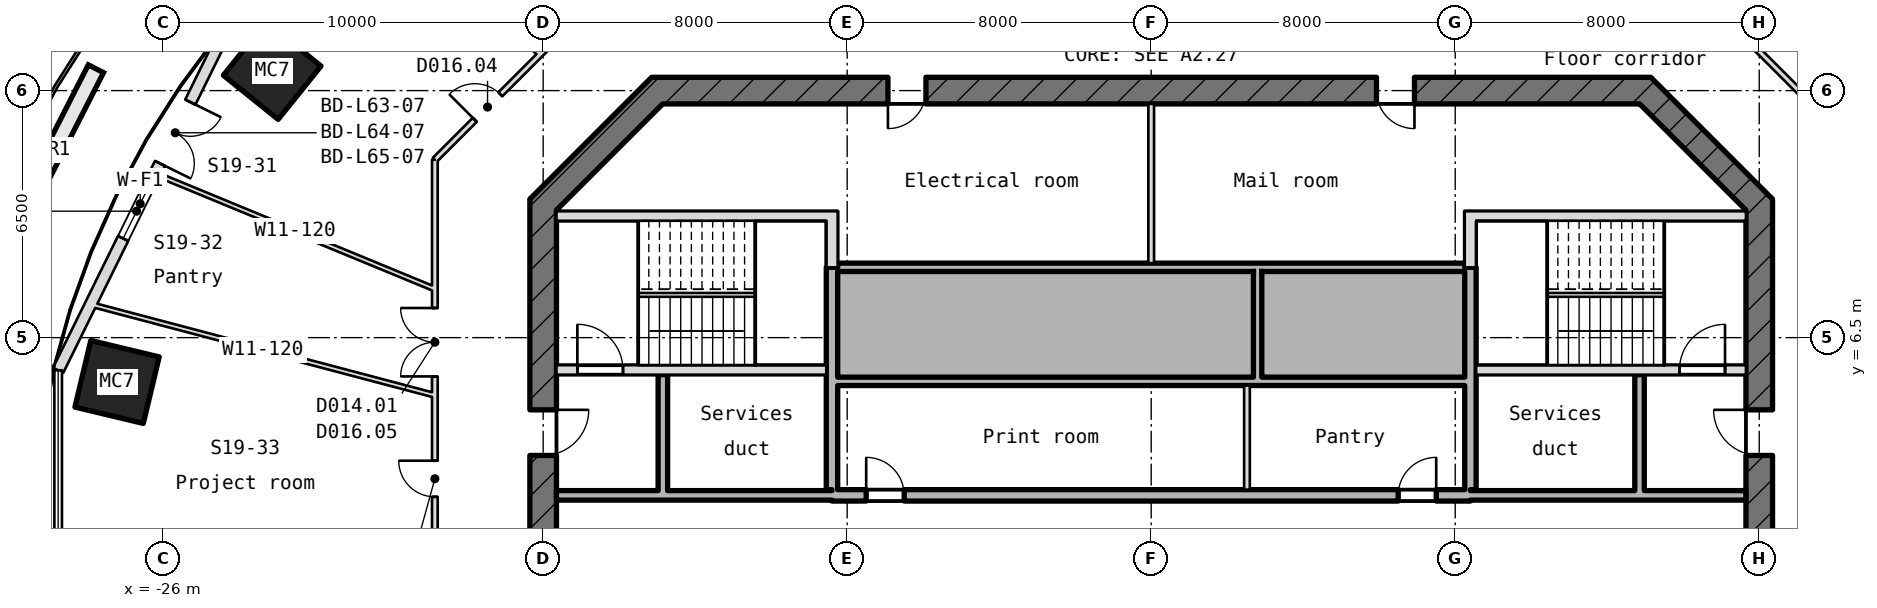
"""IFC4 building model, lengths in metres.
Left out: names, types, materials, properties, quantities, classifications, styles, units other than length and angle.
Written with IfcOpenShell. Run it as: python <this file> out.ifc"""

import sys

from ifc_helpers import new_model, si_unit, direction, frame, frame_2d, origin, origin_2d, place, context, subcontext, project, spatial, rectangle, hollow_rectangle, extrude, element, fill, save


model = new_model("IFC4")
c1 = context("Model", 3, precision=1e-05, world=origin(), true_north=direction((0.0, 1.0)))
c2 = subcontext(c1, "Body", "Model", "MODEL_VIEW")
j1 = project(units=[si_unit("LENGTHUNIT", "METRE"), si_unit("PLANEANGLEUNIT", "RADIAN")], contexts=[c1])
p1 = place(None, origin())
s1 = spatial("IfcSite", under=j1, at=p1, CompositionType="ELEMENT")
p2 = place(p1, origin())
s2 = spatial("IfcBuilding", under=s1, at=p2, CompositionType="ELEMENT")
p3 = place(p2, frame((0.0, 0.0, 284.5)))
s3 = spatial("IfcBuildingStorey", under=s2, at=p3, CompositionType="ELEMENT", Elevation=284.5)
for number, where, z_axis, x_axis in (
    (1, (-23.131, 13.524, -0.18), (0.0, 0.0, 1.0), (0.627, 0.779, 0.0)),
    (2, (-27.213, 5.333, -0.18), (0.0, 0.0, 1.0), (0.233, 0.973, 0.0)),
):
    element("IfcColumn", number, at=place(p3, frame(where, z_axis=z_axis, x_axis=x_axis)), inside=s3, PredefinedType="COLUMN", context=c2, shape_type="SweptSolid", body=[
        extrude(hollow_rectangle(XDim=1.8, YDim=1.85, WallThickness=0.06, at=origin_2d()), origin(), (0.0, 0.0, 1.0), 4.15),
    ])
p4 = place(p3, frame((-24.444, 14.402, 0.0), z_axis=(0.0, 0.0, 1.0), x_axis=(-0.442086999908, -0.896972175997, 0.0)))
e3 = element("IfcWall", 3, at=p4, inside=s3, PredefinedType="SOLIDWALL", context=c2, shape_type="SweptSolid", body=[
    extrude(rectangle(XDim=9.767, YDim=0.3, at=frame_2d((4.884, 0.0))), origin(), (0.0, 0.0, 1.0), 3.97),
])
p5 = place(p4, frame((1.9, 0.0, 0.0)))
e4 = element("IfcOpeningElement", 4, at=p5, cuts=e3, PredefinedType="OPENING", context=c2, shape_type="SweptSolid", body=[
    extrude(rectangle(XDim=1.8, YDim=2.4, at=frame_2d((0.9, 1.2))), frame((0.0, 0.16, 0.0), z_axis=(0.0, -1.0, 0.0), x_axis=(1.0, 0.0, 0.0)), (0.0, 0.0, 1.0), 0.32),
])
p6 = place(p4, frame((4.3, 0.0, 0.9)))
e5 = element("IfcOpeningElement", 5, at=p6, cuts=e3, PredefinedType="OPENING", context=c2, shape_type="SweptSolid", body=[
    extrude(rectangle(XDim=1.6, YDim=1.5, at=frame_2d((0.8, 0.75))), frame((0.0, 0.16, 0.0), z_axis=(0.0, -1.0, 0.0), x_axis=(1.0, 0.0, 0.0)), (0.0, 0.0, 1.0), 0.32),
])
p7 = place(p3, frame((16.0, -10.145, -0.18), z_axis=(0.0, 0.0, 1.0), x_axis=(0.0, 1.0, 0.0)))
e6 = element("IfcWall", 6, at=p7, inside=s3, PredefinedType="SHEAR", context=c2, shape_type="SweptSolid", body=[
    extrude(rectangle(XDim=20.29, YDim=0.7, at=frame_2d((10.145, 0.0))), origin(), (0.0, 0.0, 1.0), 4.15),
])
p8 = place(p7, frame((8.945, 0.0, 0.18)))
e7 = element("IfcOpeningElement", 7, at=p8, cuts=e6, PredefinedType="OPENING", context=c2, shape_type="SweptSolid", body=[
    extrude(rectangle(XDim=2.4, YDim=2.1, at=frame_2d((1.2, 1.05))), frame((0.0, 0.36, 0.0), z_axis=(0.0, -1.0, 0.0), x_axis=(1.0, 0.0, 0.0)), (0.0, 0.0, 1.0), 0.72),
])
p9 = place(p7, frame((13.545, 0.0, 0.18)))
e8 = element("IfcOpeningElement", 8, at=p9, cuts=e6, PredefinedType="OPENING", context=c2, shape_type="SweptSolid", body=[
    extrude(rectangle(XDim=1.2, YDim=2.1, at=frame_2d((0.6, 1.05))), frame((0.0, 0.36, 0.0), z_axis=(0.0, -1.0, 0.0), x_axis=(1.0, 0.0, 0.0)), (0.0, 0.0, 1.0), 0.72),
])
p10 = place(p7, frame((3.545, 0.0, 0.18)))
e9 = element("IfcOpeningElement", 9, at=p10, cuts=e6, PredefinedType="OPENING", context=c2, shape_type="SweptSolid", body=[
    extrude(rectangle(XDim=1.2, YDim=2.1, at=frame_2d((0.6, 1.05))), frame((0.0, 0.36, 0.0), z_axis=(0.0, -1.0, 0.0), x_axis=(1.0, 0.0, 0.0)), (0.0, 0.0, 1.0), 0.72),
])
p11 = place(p3, frame((16.103, 9.897, -0.18), z_axis=(0.0, 0.0, 1.0), x_axis=(-0.707106781187, 0.707106781187, 0.0)))
e10 = element("IfcWall", 10, at=p11, inside=s3, PredefinedType="SHEAR", context=c2, shape_type="SweptSolid", body=[
    extrude(rectangle(XDim=4.533, YDim=0.7, at=frame_2d((2.266, 0.0))), origin(), (0.0, 0.0, 1.0), 4.15),
])
p12 = place(p3, frame((13.145, 13.0, -0.18), z_axis=(0.0, 0.0, 1.0), x_axis=(-1.0, 0.0, 0.0)))
e11 = element("IfcWall", 11, at=p12, inside=s3, PredefinedType="SHEAR", context=c2, shape_type="SweptSolid", body=[
    extrude(rectangle(XDim=26.29, YDim=0.7, at=frame_2d((13.145, 0.0))), origin(), (0.0, 0.0, 1.0), 4.15),
])
p13 = place(p12, frame((19.073, 0.0, 0.18)))
e12 = element("IfcOpeningElement", 12, at=p13, cuts=e11, PredefinedType="OPENING", context=c2, shape_type="SweptSolid", body=[
    extrude(rectangle(XDim=1.0, YDim=2.1, at=frame_2d((0.5, 1.05))), frame((0.0, 0.36, 0.0), z_axis=(0.0, -1.0, 0.0), x_axis=(1.0, 0.0, 0.0)), (0.0, 0.0, 1.0), 0.72),
])
p14 = place(p12, frame((6.217, 0.0, 0.18)))
e13 = element("IfcOpeningElement", 13, at=p14, cuts=e11, PredefinedType="OPENING", context=c2, shape_type="SweptSolid", body=[
    extrude(rectangle(XDim=1.0, YDim=2.1, at=frame_2d((0.5, 1.05))), frame((0.0, 0.36, 0.0), z_axis=(0.0, -1.0, 0.0), x_axis=(1.0, 0.0, 0.0)), (0.0, 0.0, 1.0), 0.72),
])
p15 = place(p3, frame((-12.897, 13.103, -0.18), z_axis=(0.0, 0.0, 1.0), x_axis=(-0.707106781187, -0.707106781187, 0.0)))
e14 = element("IfcWall", 14, at=p15, inside=s3, PredefinedType="SHEAR", context=c2, shape_type="SweptSolid", body=[
    extrude(rectangle(XDim=4.533, YDim=0.7, at=frame_2d((2.266, 0.0))), origin(), (0.0, 0.0, 1.0), 4.15),
])
p16 = place(p3, frame((-16.0, 10.145, -0.18), z_axis=(0.0, 0.0, 1.0), x_axis=(0.0, -1.0, 0.0)))
e15 = element("IfcWall", 15, at=p16, inside=s3, PredefinedType="SHEAR", context=c2, shape_type="SweptSolid", body=[
    extrude(rectangle(XDim=20.29, YDim=0.7, at=frame_2d((10.145, 0.0))), origin(), (0.0, 0.0, 1.0), 4.15),
])
p17 = place(p16, frame((8.945, 0.0, 0.18)))
e16 = element("IfcOpeningElement", 16, at=p17, cuts=e15, PredefinedType="OPENING", context=c2, shape_type="SweptSolid", body=[
    extrude(rectangle(XDim=2.4, YDim=2.1, at=frame_2d((1.2, 1.05))), frame((0.0, 0.36, 0.0), z_axis=(0.0, -1.0, 0.0), x_axis=(1.0, 0.0, 0.0)), (0.0, 0.0, 1.0), 0.72),
])
p18 = place(p16, frame((5.545, 0.0, 0.18)))
e17 = element("IfcOpeningElement", 17, at=p18, cuts=e15, PredefinedType="OPENING", context=c2, shape_type="SweptSolid", body=[
    extrude(rectangle(XDim=1.2, YDim=2.1, at=frame_2d((0.6, 1.05))), frame((0.0, 0.36, 0.0), z_axis=(0.0, -1.0, 0.0), x_axis=(1.0, 0.0, 0.0)), (0.0, 0.0, 1.0), 0.72),
])
p19 = place(p3, frame((-15.65, 2.35, 0.0), z_axis=(0.0, 0.0, 1.0), x_axis=(1.0, 0.0, 0.0)))
e18 = element("IfcWall", 18, at=p19, inside=s3, PredefinedType="STANDARD", context=c2, shape_type="SweptSolid", body=[
    extrude(rectangle(XDim=7.25, YDim=0.25, at=frame_2d((3.625, 0.0))), origin(), (0.0, 0.0, 1.0), 3.97),
])
p20 = place(p3, frame((-8.4, 2.35, -0.18), z_axis=(0.0, 0.0, 1.0), x_axis=(1.0, 0.0, 0.0)))
e19 = element("IfcWall", 19, at=p20, inside=s3, PredefinedType="SHEAR", context=c2, shape_type="SweptSolid", body=[
    extrude(rectangle(XDim=16.8, YDim=0.3, at=frame_2d((8.4, 0.0))), origin(), (0.0, 0.0, 1.0), 4.15),
])
p21 = place(p20, frame((0.9, 0.0, 0.18)))
e20 = element("IfcOpeningElement", 20, at=p21, cuts=e19, PredefinedType="OPENING", context=c2, shape_type="SweptSolid", body=[
    extrude(rectangle(XDim=1.0, YDim=2.1, at=frame_2d((0.5, 1.05))), frame((0.0, 0.16, 0.0), z_axis=(0.0, -1.0, 0.0), x_axis=(1.0, 0.0, 0.0)), (0.0, 0.0, 1.0), 0.32),
])
p22 = place(p20, frame((14.9, 0.0, 0.18)))
e21 = element("IfcOpeningElement", 21, at=p22, cuts=e19, PredefinedType="OPENING", context=c2, shape_type="SweptSolid", body=[
    extrude(rectangle(XDim=1.0, YDim=2.1, at=frame_2d((0.5, 1.05))), frame((0.0, 0.16, 0.0), z_axis=(0.0, -1.0, 0.0), x_axis=(1.0, 0.0, 0.0)), (0.0, 0.0, 1.0), 0.32),
])
p23 = place(p3, frame((8.4, 2.35, 0.0), z_axis=(0.0, 0.0, 1.0), x_axis=(1.0, 0.0, 0.0)))
e22 = element("IfcWall", 22, at=p23, inside=s3, PredefinedType="STANDARD", context=c2, shape_type="SweptSolid", body=[
    extrude(rectangle(XDim=7.25, YDim=0.25, at=frame_2d((3.625, 0.0))), origin(), (0.0, 0.0, 1.0), 3.97),
])
p24 = place(p3, frame((-8.25, 5.35, 0.0), z_axis=(0.0, 0.0, 1.0), x_axis=(1.0, 0.0, 0.0)))
e23 = element("IfcWall", 23, at=p24, inside=s3, PredefinedType="STANDARD", context=c2, shape_type="SweptSolid", body=[
    extrude(rectangle(XDim=16.5, YDim=0.22, at=frame_2d((8.25, 0.0))), origin(), (0.0, 0.0, 1.0), 3.97),
])
p25 = place(p3, frame((-15.65, 5.65, -0.18), z_axis=(0.0, 0.0, 1.0), x_axis=(1.0, 0.0, 0.0)))
e24 = element("IfcWall", 24, at=p25, inside=s3, PredefinedType="SHEAR", context=c2, shape_type="SweptSolid", body=[
    extrude(rectangle(XDim=7.1, YDim=0.25, at=frame_2d((3.55, 0.0))), origin(), (0.0, 0.0, 1.0), 4.15),
])
p26 = place(p25, frame((0.55, 0.0, 0.18)))
e25 = element("IfcOpeningElement", 25, at=p26, cuts=e24, PredefinedType="OPENING", context=c2, shape_type="SweptSolid", body=[
    extrude(rectangle(XDim=1.2, YDim=2.1, at=frame_2d((0.6, 1.05))), frame((0.0, 0.135, 0.0), z_axis=(0.0, -1.0, 0.0), x_axis=(1.0, 0.0, 0.0)), (0.0, 0.0, 1.0), 0.27),
])
p27 = place(p3, frame((8.55, 5.65, -0.18), z_axis=(0.0, 0.0, 1.0), x_axis=(1.0, 0.0, 0.0)))
e26 = element("IfcWall", 26, at=p27, inside=s3, PredefinedType="SHEAR", context=c2, shape_type="SweptSolid", body=[
    extrude(rectangle(XDim=7.1, YDim=0.25, at=frame_2d((3.55, 0.0))), origin(), (0.0, 0.0, 1.0), 4.15),
])
p28 = place(p27, frame((5.35, 0.0, 0.18)))
e27 = element("IfcOpeningElement", 27, at=p28, cuts=e26, PredefinedType="OPENING", context=c2, shape_type="SweptSolid", body=[
    extrude(rectangle(XDim=1.2, YDim=2.1, at=frame_2d((0.6, 1.05))), frame((0.0, 0.135, 0.0), z_axis=(0.0, -1.0, 0.0), x_axis=(1.0, 0.0, 0.0)), (0.0, 0.0, 1.0), 0.27),
])
p29 = place(p3, frame((-8.25, 8.35, 0.0), z_axis=(0.0, 0.0, 1.0), x_axis=(1.0, 0.0, 0.0)))
e28 = element("IfcWall", 28, at=p29, inside=s3, PredefinedType="STANDARD", context=c2, shape_type="SweptSolid", body=[
    extrude(rectangle(XDim=16.5, YDim=0.22, at=frame_2d((8.25, 0.0))), origin(), (0.0, 0.0, 1.0), 3.97),
])
for number, where, z_axis, x_axis in (
    (29, (-15.65, 9.7, -0.18), (0.0, 0.0, 1.0), (1.0, 0.0, 0.0)),
    (30, (8.55, 9.7, -0.18), (0.0, 0.0, 1.0), (1.0, 0.0, 0.0)),
):
    element("IfcWall", number, at=place(p3, frame(where, z_axis=z_axis, x_axis=x_axis)), inside=s3, PredefinedType="SHEAR", context=c2, shape_type="SweptSolid", body=[
        extrude(rectangle(XDim=7.1, YDim=0.25, at=frame_2d((3.55, 0.0))), origin(), (0.0, 0.0, 1.0), 4.15),
    ])
p30 = place(p3, frame((-12.85, 2.475, 0.0), z_axis=(0.0, 0.0, 1.0), x_axis=(0.0, 1.0, 0.0)))
e31 = element("IfcWall", 31, at=p30, inside=s3, PredefinedType="STANDARD", context=c2, shape_type="SweptSolid", body=[
    extrude(rectangle(XDim=3.05, YDim=0.25, at=frame_2d((1.525, 0.0))), origin(), (0.0, 0.0, 1.0), 3.97),
])
p31 = place(p3, frame((-8.4, 2.5, -0.18), z_axis=(0.0, 0.0, 1.0), x_axis=(0.0, 1.0, 0.0)))
e32 = element("IfcWall", 32, at=p31, inside=s3, PredefinedType="SHEAR", context=c2, shape_type="SweptSolid", body=[
    extrude(rectangle(XDim=5.85, YDim=0.3, at=frame_2d((2.925, 0.0))), origin(), (0.0, 0.0, 1.0), 4.15),
])
p32 = place(p3, frame((-8.4, 8.35, -0.18), z_axis=(0.0, 0.0, 1.0), x_axis=(0.0, 1.0, 0.0)))
e33 = element("IfcWall", 33, at=p32, inside=s3, PredefinedType="SHEAR", context=c2, shape_type="SweptSolid", body=[
    extrude(rectangle(XDim=1.475, YDim=0.3, at=frame_2d((0.737, 0.0))), origin(), (0.0, 0.0, 1.0), 4.15),
])
p33 = place(p3, frame((0.0, 8.46, 0.0), z_axis=(0.0, 0.0, 1.0), x_axis=(0.0, 1.0, 0.0)))
e34 = element("IfcWall", 34, at=p33, inside=s3, PredefinedType="PARTITIONING", context=c2, shape_type="SweptSolid", body=[
    extrude(rectangle(XDim=4.19, YDim=0.15, at=frame_2d((2.095, 0.0))), origin(), (0.0, 0.0, 1.0), 3.97),
])
p34 = place(p3, frame((2.52, 2.5, 0.0), z_axis=(0.0, 0.0, 1.0), x_axis=(0.0, 1.0, 0.0)))
e35 = element("IfcWall", 35, at=p34, inside=s3, PredefinedType="PARTITIONING", context=c2, shape_type="SweptSolid", body=[
    extrude(rectangle(XDim=2.74, YDim=0.15, at=frame_2d((1.37, 0.0))), origin(), (0.0, 0.0, 1.0), 3.97),
])
p35 = place(p3, frame((2.8, 5.46, 0.0), z_axis=(0.0, 0.0, 1.0), x_axis=(0.0, 1.0, 0.0)))
e36 = element("IfcWall", 36, at=p35, inside=s3, PredefinedType="STANDARD", context=c2, shape_type="SweptSolid", body=[
    extrude(rectangle(XDim=2.78, YDim=0.22, at=frame_2d((1.39, 0.0))), origin(), (0.0, 0.0, 1.0), 3.97),
])
p36 = place(p3, frame((8.4, 2.5, -0.18), z_axis=(0.0, 0.0, 1.0), x_axis=(0.0, 1.0, 0.0)))
e37 = element("IfcWall", 37, at=p36, inside=s3, PredefinedType="SHEAR", context=c2, shape_type="SweptSolid", body=[
    extrude(rectangle(XDim=5.85, YDim=0.3, at=frame_2d((2.925, 0.0))), origin(), (0.0, 0.0, 1.0), 4.15),
])
p37 = place(p3, frame((8.4, 8.35, -0.18), z_axis=(0.0, 0.0, 1.0), x_axis=(0.0, 1.0, 0.0)))
e38 = element("IfcWall", 38, at=p37, inside=s3, PredefinedType="SHEAR", context=c2, shape_type="SweptSolid", body=[
    extrude(rectangle(XDim=1.475, YDim=0.3, at=frame_2d((0.737, 0.0))), origin(), (0.0, 0.0, 1.0), 4.15),
])
p38 = place(p3, frame((12.85, 2.475, 0.0), z_axis=(0.0, 0.0, 1.0), x_axis=(0.0, 1.0, 0.0)))
e39 = element("IfcWall", 39, at=p38, inside=s3, PredefinedType="STANDARD", context=c2, shape_type="SweptSolid", body=[
    extrude(rectangle(XDim=3.05, YDim=0.25, at=frame_2d((1.525, 0.0))), origin(), (0.0, 0.0, 1.0), 3.97),
])
p39 = place(p3, frame((-18.85, -11.18, 0.0), z_axis=(0.0, 0.0, 1.0), x_axis=(0.0, 1.0, 0.0)))
e40 = element("IfcWall", 40, at=p39, inside=s3, PredefinedType="PARTITIONING", context=c2, shape_type="SweptSolid", body=[
    extrude(rectangle(XDim=22.361, YDim=0.15, at=frame_2d((11.18, 0.0))), origin(), (0.0, 0.0, 1.0), 3.97),
])
p40 = place(p39, frame((16.66, 0.0, 0.0)))
e41 = element("IfcOpeningElement", 41, at=p40, cuts=e40, PredefinedType="OPENING", context=c2, shape_type="SweptSolid", body=[
    extrude(rectangle(XDim=1.8, YDim=2.1, at=frame_2d((0.9, 1.05))), frame((0.0, 0.085, 0.0), z_axis=(0.0, -1.0, 0.0), x_axis=(1.0, 0.0, 0.0)), (0.0, 0.0, 1.0), 0.17),
])
p41 = place(p39, frame((13.492, 0.0, 0.0)))
e42 = element("IfcOpeningElement", 42, at=p41, cuts=e40, PredefinedType="OPENING", context=c2, shape_type="SweptSolid", body=[
    extrude(rectangle(XDim=0.95, YDim=2.1, at=frame_2d((0.475, 1.05))), frame((0.0, 0.085, 0.0), z_axis=(0.0, -1.0, 0.0), x_axis=(1.0, 0.0, 0.0)), (0.0, 0.0, 1.0), 0.17),
])
p42 = place(p39, frame((6.952, 0.0, 0.0)))
e43 = element("IfcOpeningElement", 43, at=p42, cuts=e40, PredefinedType="OPENING", context=c2, shape_type="SweptSolid", body=[
    extrude(rectangle(XDim=0.95, YDim=2.1, at=frame_2d((0.475, 1.05))), frame((0.0, 0.085, 0.0), z_axis=(0.0, -1.0, 0.0), x_axis=(1.0, 0.0, 0.0)), (0.0, 0.0, 1.0), 0.17),
])
p43 = place(p3, frame((-18.85, 4.982, 0.0), z_axis=(0.0, 0.0, 1.0), x_axis=(-0.96680393986, 0.255519357134, 0.0)))
e44 = element("IfcWall", 44, at=p43, inside=s3, PredefinedType="PARTITIONING", context=c2, shape_type="SweptSolid", body=[
    extrude(rectangle(XDim=9.368, YDim=0.12, at=frame_2d((4.684, 0.0))), origin(), (0.0, 0.0, 1.0), 3.97),
])
p44 = place(p3, frame((-18.85, 7.777, 0.0), z_axis=(0.0, 0.0, 1.0), x_axis=(-0.924418879756, 0.381378728759, 0.0)))
e45 = element("IfcWall", 45, at=p44, inside=s3, PredefinedType="PARTITIONING", context=c2, shape_type="SweptSolid", body=[
    extrude(rectangle(XDim=7.965, YDim=0.12, at=frame_2d((3.982, 0.0))), origin(), (0.0, 0.0, 1.0), 3.97),
])
p45 = place(p3, frame((-18.85, 11.18, 0.0), z_axis=(0.0, 0.0, 1.0), x_axis=(0.707106781187, 0.707106781187, 0.0)))
e46 = element("IfcWall", 46, at=p45, inside=s3, PredefinedType="PARTITIONING", context=c2, shape_type="SweptSolid", body=[
    extrude(rectangle(XDim=6.604, YDim=0.15, at=frame_2d((3.302, 0.0))), origin(), (0.0, 0.0, 1.0), 3.97),
])
p46 = place(p45, frame((1.486, 0.0, 0.0)))
e47 = element("IfcOpeningElement", 47, at=p46, cuts=e46, PredefinedType="OPENING", context=c2, shape_type="SweptSolid", body=[
    extrude(rectangle(XDim=0.95, YDim=2.1, at=frame_2d((0.475, 1.05))), frame((0.0, 0.085, 0.0), z_axis=(0.0, -1.0, 0.0), x_axis=(1.0, 0.0, 0.0)), (0.0, 0.0, 1.0), 0.17),
])
p47 = place(p3, frame((-16.076, 13.954, 0.0), z_axis=(0.0, 0.0, 1.0), x_axis=(-0.755226494758, 0.655463913283, 0.0)))
e48 = element("IfcWall", 48, at=p47, inside=s3, PredefinedType="PARTITIONING", context=c2, shape_type="SweptSolid", body=[
    extrude(rectangle(XDim=4.111, YDim=0.12, at=frame_2d((2.056, 0.0))), origin(), (0.0, 0.0, 1.0), 3.66),
])
p48 = place(p3, frame((14.18, 15.85, 0.0), z_axis=(0.0, 0.0, 1.0), x_axis=(0.707106781187, -0.707106781187, 0.0)))
e49 = element("IfcWall", 49, at=p48, inside=s3, PredefinedType="PARTITIONING", context=c2, shape_type="SweptSolid", body=[
    extrude(rectangle(XDim=6.604, YDim=0.15, at=frame_2d((3.302, 0.0))), origin(), (0.0, 0.0, 1.0), 3.97),
])
p49 = place(p5, origin())
e50 = element("IfcDoor", 50, at=p49, inside=s3, OperationType="SINGLE_SWING_LEFT", PredefinedType="DOOR", context=c2, shape_type="SweptSolid", body=[
    extrude(rectangle(XDim=1.8, YDim=2.4, at=frame_2d((0.9, 1.2))), frame((0.0, 0.025, 0.0), z_axis=(0.0, -1.0, 0.0), x_axis=(1.0, 0.0, 0.0)), (0.0, 0.0, 1.0), 0.05),
])
fill(e4, e50)
p50 = place(p6, origin())
e51 = element("IfcWindow", 51, at=p50, inside=s3, PartitioningType="SINGLE_PANEL", PredefinedType="WINDOW", context=c2, shape_type="SweptSolid", body=[
    extrude(rectangle(XDim=1.6, YDim=1.5, at=frame_2d((0.8, 0.75))), frame((0.0, 0.03, 0.0), z_axis=(0.0, -1.0, 0.0), x_axis=(1.0, 0.0, 0.0)), (0.0, 0.0, 1.0), 0.06),
])
fill(e5, e51)
p51 = place(p26, origin())
e52 = element("IfcDoor", 52, at=p51, inside=s3, OperationType="SINGLE_SWING_RIGHT", PredefinedType="DOOR", context=c2, shape_type="SweptSolid", body=[
    extrude(rectangle(XDim=1.2, YDim=2.1, at=frame_2d((0.6, 1.05))), frame((0.0, 0.025, 0.0), z_axis=(0.0, -1.0, 0.0), x_axis=(1.0, 0.0, 0.0)), (0.0, 0.0, 1.0), 0.05),
])
fill(e25, e52)
p52 = place(p28, origin())
e53 = element("IfcDoor", 53, at=p52, inside=s3, OperationType="SINGLE_SWING_RIGHT", PredefinedType="DOOR", context=c2, shape_type="SweptSolid", body=[
    extrude(rectangle(XDim=1.2, YDim=2.1, at=frame_2d((0.6, 1.05))), frame((0.0, 0.025, 0.0), z_axis=(0.0, -1.0, 0.0), x_axis=(1.0, 0.0, 0.0)), (0.0, 0.0, 1.0), 0.05),
])
fill(e27, e53)
p53 = place(p18, origin())
e54 = element("IfcDoor", 54, at=p53, inside=s3, OperationType="SINGLE_SWING_RIGHT", PredefinedType="DOOR", context=c2, shape_type="SweptSolid", body=[
    extrude(rectangle(XDim=1.2, YDim=2.1, at=frame_2d((0.6, 1.05))), frame((0.0, 0.025, 0.0), z_axis=(0.0, -1.0, 0.0), x_axis=(1.0, 0.0, 0.0)), (0.0, 0.0, 1.0), 0.05),
])
fill(e17, e54)
p54 = place(p9, origin())
e55 = element("IfcDoor", 55, at=p54, inside=s3, OperationType="SINGLE_SWING_RIGHT", PredefinedType="DOOR", context=c2, shape_type="SweptSolid", body=[
    extrude(rectangle(XDim=1.2, YDim=2.1, at=frame_2d((0.6, 1.05))), frame((0.0, 0.025, 0.0), z_axis=(0.0, -1.0, 0.0), x_axis=(1.0, 0.0, 0.0)), (0.0, 0.0, 1.0), 0.05),
])
fill(e8, e55)
p55 = place(p21, origin())
e56 = element("IfcDoor", 56, at=p55, inside=s3, OperationType="SINGLE_SWING_RIGHT", PredefinedType="DOOR", context=c2, shape_type="SweptSolid", body=[
    extrude(rectangle(XDim=1.0, YDim=2.1, at=frame_2d((0.5, 1.05))), frame((0.0, 0.025, 0.0), z_axis=(0.0, -1.0, 0.0), x_axis=(1.0, 0.0, 0.0)), (0.0, 0.0, 1.0), 0.05),
])
fill(e20, e56)
p56 = place(p22, origin())
e57 = element("IfcDoor", 57, at=p56, inside=s3, OperationType="SINGLE_SWING_RIGHT", PredefinedType="DOOR", context=c2, shape_type="SweptSolid", body=[
    extrude(rectangle(XDim=1.0, YDim=2.1, at=frame_2d((0.5, 1.05))), frame((0.0, 0.025, 0.0), z_axis=(0.0, -1.0, 0.0), x_axis=(1.0, 0.0, 0.0)), (0.0, 0.0, 1.0), 0.05),
])
fill(e21, e57)
p57 = place(p13, origin())
e58 = element("IfcDoor", 58, at=p57, inside=s3, OperationType="SINGLE_SWING_RIGHT", PredefinedType="DOOR", context=c2, shape_type="SweptSolid", body=[
    extrude(rectangle(XDim=1.0, YDim=2.1, at=frame_2d((0.5, 1.05))), frame((0.0, 0.025, 0.0), z_axis=(0.0, -1.0, 0.0), x_axis=(1.0, 0.0, 0.0)), (0.0, 0.0, 1.0), 0.05),
])
fill(e12, e58)
p58 = place(p14, origin())
e59 = element("IfcDoor", 59, at=p58, inside=s3, OperationType="SINGLE_SWING_RIGHT", PredefinedType="DOOR", context=c2, shape_type="SweptSolid", body=[
    extrude(rectangle(XDim=1.0, YDim=2.1, at=frame_2d((0.5, 1.05))), frame((0.0, 0.025, 0.0), z_axis=(0.0, -1.0, 0.0), x_axis=(1.0, 0.0, 0.0)), (0.0, 0.0, 1.0), 0.05),
])
fill(e13, e59)
p59 = place(p46, origin())
e60 = element("IfcDoor", 60, at=p59, inside=s3, OperationType="SINGLE_SWING_RIGHT", PredefinedType="DOOR", context=c2, shape_type="SweptSolid", body=[
    extrude(rectangle(XDim=0.95, YDim=2.1, at=frame_2d((0.475, 1.05))), frame((0.0, 0.025, 0.0), z_axis=(0.0, -1.0, 0.0), x_axis=(1.0, 0.0, 0.0)), (0.0, 0.0, 1.0), 0.05),
])
fill(e47, e60)
p60 = place(p40, origin())
e61 = element("IfcDoor", 61, at=p60, inside=s3, OperationType="DOUBLE_DOOR_SINGLE_SWING", PredefinedType="DOOR", context=c2, shape_type="SweptSolid", body=[
    extrude(rectangle(XDim=1.8, YDim=2.1, at=frame_2d((0.9, 1.05))), frame((0.0, 0.025, 0.0), z_axis=(0.0, -1.0, 0.0), x_axis=(1.0, 0.0, 0.0)), (0.0, 0.0, 1.0), 0.05),
])
fill(e41, e61)
p61 = place(p41, origin())
e62 = element("IfcDoor", 62, at=p61, inside=s3, OperationType="SINGLE_SWING_RIGHT", PredefinedType="DOOR", context=c2, shape_type="SweptSolid", body=[
    extrude(rectangle(XDim=0.95, YDim=2.1, at=frame_2d((0.475, 1.05))), frame((0.0, 0.025, 0.0), z_axis=(0.0, -1.0, 0.0), x_axis=(1.0, 0.0, 0.0)), (0.0, 0.0, 1.0), 0.05),
])
fill(e42, e62)
save(model, sys.argv[1])
